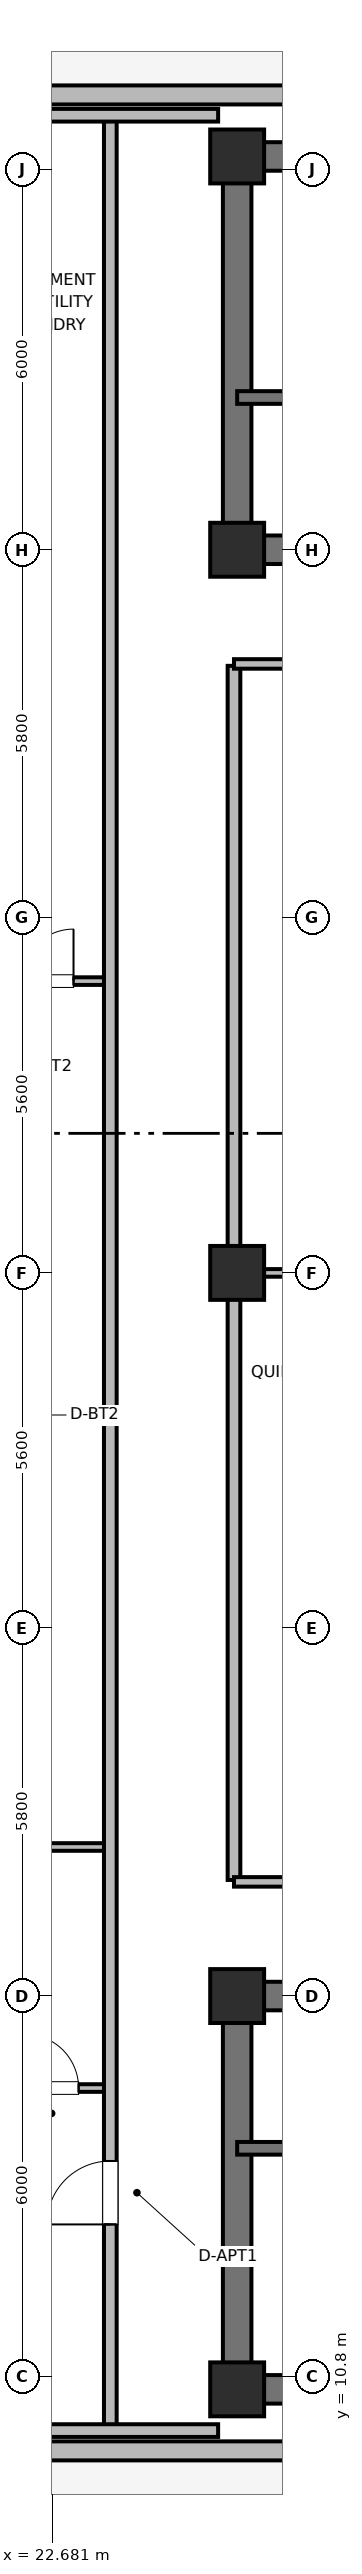
"""IFC4 building model, lengths in metres.
Left out: names, types, materials, properties, quantities, classifications, styles, units other than length and angle.
Written with IfcOpenShell. Run it as: python <this file> out.ifc"""

import sys

from ifc_helpers import new_model, si_unit, direction, frame, frame_2d, origin, origin_2d, place, context, subcontext, project, spatial, rectangle, extrude, element, fill, save


model = new_model("IFC4")
c1 = context("Model", 3, precision=1e-05, world=origin(), true_north=direction((0.0, 1.0)))
c2 = subcontext(c1, "Body", "Model", "MODEL_VIEW")
j1 = project(units=[si_unit("LENGTHUNIT", "METRE"), si_unit("PLANEANGLEUNIT", "RADIAN")], contexts=[c1])
p1 = place(None, origin())
s1 = spatial("IfcSite", under=j1, at=p1, CompositionType="ELEMENT")
p2 = place(p1, origin())
s2 = spatial("IfcBuilding", under=s1, at=p2, CompositionType="ELEMENT")
p3 = place(p2, frame((0.0, 0.0, 225.8)))
s3 = spatial("IfcBuildingStorey", under=s2, at=p3, CompositionType="ELEMENT", Elevation=225.8)
p4 = place(p3, frame((52.8, 10.6, 0.0), z_axis=(0.0, 0.0, 1.0), x_axis=(-1.0, 0.0, 0.0)))
e1 = element("IfcWall", 1, at=p4, inside=s3, PredefinedType="SHEAR", context=c2, shape_type="SweptSolid", body=[
    extrude(rectangle(XDim=27.2, YDim=0.45, at=frame_2d((13.6, 0.0))), origin(), (0.0, 0.0, 1.0), 3.7),
])
p5 = place(p3, frame((25.6, 10.825, 0.0), z_axis=(0.0, 0.0, 1.0), x_axis=(0.0, 1.0, 0.0)))
e2 = element("IfcWall", 2, at=p5, inside=s3, PredefinedType="SHEAR", context=c2, shape_type="SweptSolid", body=[
    extrude(rectangle(XDim=5.75, YDim=0.45, at=frame_2d((2.875, 0.0))), origin(), (0.0, 0.0, 1.0), 3.7),
])
p6 = place(p3, frame((25.6, 16.8, 0.0), z_axis=(0.0, 0.0, 1.0), x_axis=(1.0, 0.0, 0.0)))
e3 = element("IfcWall", 3, at=p6, inside=s3, PredefinedType="SHEAR", context=c2, shape_type="SweptSolid", body=[
    extrude(rectangle(XDim=27.2, YDim=0.45, at=frame_2d((13.6, 0.0))), origin(), (0.0, 0.0, 1.0), 3.7),
])
p7 = place(p6, frame((1.8, 0.0, 0.0)))
e4 = element("IfcOpeningElement", 4, at=p7, cuts=e3, PredefinedType="OPENING", context=c2, shape_type="SweptSolid", body=[
    extrude(rectangle(XDim=1.1, YDim=2.15, at=frame_2d((0.55, 1.075))), frame((0.0, 0.235, 0.0), z_axis=(0.0, -1.0, 0.0), x_axis=(1.0, 0.0, 0.0)), (0.0, 0.0, 1.0), 0.47),
])
p8 = place(p6, frame((5.6, 0.0, 0.0)))
e5 = element("IfcOpeningElement", 5, at=p8, cuts=e3, PredefinedType="OPENING", context=c2, shape_type="SweptSolid", body=[
    extrude(rectangle(XDim=0.85, YDim=2.1, at=frame_2d((0.425, 1.05))), frame((0.0, 0.235, 0.0), z_axis=(0.0, -1.0, 0.0), x_axis=(1.0, 0.0, 0.0)), (0.0, 0.0, 1.0), 0.47),
])
p9 = place(p6, frame((13.0, 0.0, 0.0)))
e6 = element("IfcOpeningElement", 6, at=p9, cuts=e3, PredefinedType="OPENING", context=c2, shape_type="SweptSolid", body=[
    extrude(rectangle(XDim=1.2, YDim=2.15, at=frame_2d((0.6, 1.075))), frame((0.0, 0.235, 0.0), z_axis=(0.0, -1.0, 0.0), x_axis=(1.0, 0.0, 0.0)), (0.0, 0.0, 1.0), 0.47),
])
p10 = place(p6, frame((19.2, 0.0, 0.0)))
e7 = element("IfcOpeningElement", 7, at=p10, cuts=e3, PredefinedType="OPENING", context=c2, shape_type="SweptSolid", body=[
    extrude(rectangle(XDim=0.85, YDim=2.1, at=frame_2d((0.425, 1.05))), frame((0.0, 0.235, 0.0), z_axis=(0.0, -1.0, 0.0), x_axis=(1.0, 0.0, 0.0)), (0.0, 0.0, 1.0), 0.47),
])
p11 = place(p6, frame((23.8, 0.0, 0.0)))
e8 = element("IfcOpeningElement", 8, at=p11, cuts=e3, PredefinedType="OPENING", context=c2, shape_type="SweptSolid", body=[
    extrude(rectangle(XDim=0.9, YDim=2.1, at=frame_2d((0.45, 1.05))), frame((0.0, 0.235, 0.0), z_axis=(0.0, -1.0, 0.0), x_axis=(1.0, 0.0, 0.0)), (0.0, 0.0, 1.0), 0.47),
])
p12 = place(p3, frame((25.6, 45.8, 0.0), z_axis=(0.0, 0.0, 1.0), x_axis=(1.0, 0.0, 0.0)))
e9 = element("IfcWall", 9, at=p12, inside=s3, PredefinedType="SHEAR", context=c2, shape_type="SweptSolid", body=[
    extrude(rectangle(XDim=27.2, YDim=0.45, at=frame_2d((13.6, 0.0))), origin(), (0.0, 0.0, 1.0), 3.7),
])
p13 = place(p3, frame((25.6, 39.825, 0.0), z_axis=(0.0, 0.0, 1.0), x_axis=(0.0, 1.0, 0.0)))
e10 = element("IfcWall", 10, at=p13, inside=s3, PredefinedType="SHEAR", context=c2, shape_type="SweptSolid", body=[
    extrude(rectangle(XDim=5.75, YDim=0.45, at=frame_2d((2.875, 0.0))), origin(), (0.0, 0.0, 1.0), 3.7),
])
p14 = place(p3, frame((52.8, 39.6, 0.0), z_axis=(0.0, 0.0, 1.0), x_axis=(-1.0, 0.0, 0.0)))
e11 = element("IfcWall", 11, at=p14, inside=s3, PredefinedType="SHEAR", context=c2, shape_type="SweptSolid", body=[
    extrude(rectangle(XDim=27.2, YDim=0.45, at=frame_2d((13.6, 0.0))), origin(), (0.0, 0.0, 1.0), 3.7),
])
p15 = place(p14, frame((24.2, 0.0, 0.0)))
e12 = element("IfcOpeningElement", 12, at=p15, cuts=e11, PredefinedType="OPENING", context=c2, shape_type="SweptSolid", body=[
    extrude(rectangle(XDim=1.1, YDim=2.15, at=frame_2d((0.55, 1.075))), frame((0.0, 0.235, 0.0), z_axis=(0.0, -1.0, 0.0), x_axis=(1.0, 0.0, 0.0)), (0.0, 0.0, 1.0), 0.47),
])
p16 = place(p14, frame((20.55, 0.0, 0.0)))
e13 = element("IfcOpeningElement", 13, at=p16, cuts=e11, PredefinedType="OPENING", context=c2, shape_type="SweptSolid", body=[
    extrude(rectangle(XDim=0.95, YDim=2.1, at=frame_2d((0.475, 1.05))), frame((0.0, 0.235, 0.0), z_axis=(0.0, -1.0, 0.0), x_axis=(1.0, 0.0, 0.0)), (0.0, 0.0, 1.0), 0.47),
])
p17 = place(p14, frame((15.1, 0.0, 0.0)))
e14 = element("IfcOpeningElement", 14, at=p17, cuts=e11, PredefinedType="OPENING", context=c2, shape_type="SweptSolid", body=[
    extrude(rectangle(XDim=1.2, YDim=2.15, at=frame_2d((0.6, 1.075))), frame((0.0, 0.235, 0.0), z_axis=(0.0, -1.0, 0.0), x_axis=(1.0, 0.0, 0.0)), (0.0, 0.0, 1.0), 0.47),
])
p18 = place(p14, frame((13.05, 0.0, 0.0)))
e15 = element("IfcOpeningElement", 15, at=p18, cuts=e11, PredefinedType="OPENING", context=c2, shape_type="SweptSolid", body=[
    extrude(rectangle(XDim=0.85, YDim=2.1, at=frame_2d((0.425, 1.05))), frame((0.0, 0.235, 0.0), z_axis=(0.0, -1.0, 0.0), x_axis=(1.0, 0.0, 0.0)), (0.0, 0.0, 1.0), 0.47),
])
p19 = place(p14, frame((11.0, 0.0, 0.0)))
e16 = element("IfcOpeningElement", 16, at=p19, cuts=e11, PredefinedType="OPENING", context=c2, shape_type="SweptSolid", body=[
    extrude(rectangle(XDim=0.85, YDim=2.1, at=frame_2d((0.425, 1.05))), frame((0.0, 0.235, 0.0), z_axis=(0.0, -1.0, 0.0), x_axis=(1.0, 0.0, 0.0)), (0.0, 0.0, 1.0), 0.47),
])
p20 = place(p14, frame((7.35, 0.0, 0.0)))
e17 = element("IfcOpeningElement", 17, at=p20, cuts=e11, PredefinedType="OPENING", context=c2, shape_type="SweptSolid", body=[
    extrude(rectangle(XDim=0.85, YDim=2.1, at=frame_2d((0.425, 1.05))), frame((0.0, 0.235, 0.0), z_axis=(0.0, -1.0, 0.0), x_axis=(1.0, 0.0, 0.0)), (0.0, 0.0, 1.0), 0.47),
])
p21 = place(p14, frame((4.2, 0.0, 0.0)))
e18 = element("IfcOpeningElement", 18, at=p21, cuts=e11, PredefinedType="OPENING", context=c2, shape_type="SweptSolid", body=[
    extrude(rectangle(XDim=1.3, YDim=2.2, at=frame_2d((0.65, 1.1))), frame((0.0, 0.235, 0.0), z_axis=(0.0, -1.0, 0.0), x_axis=(1.0, 0.0, 0.0)), (0.0, 0.0, 1.0), 0.47),
])
for number, where, z_axis, x_axis in (
    (19, (25.6, 10.6, 0.0), (0.0, 0.0, 1.0), (1.0, 0.0, 0.0)),
    (20, (25.6, 16.8, 0.0), (0.0, 0.0, 1.0), (1.0, 0.0, 0.0)),
    (21, (25.6, 39.6, 0.0), (0.0, 0.0, 1.0), (1.0, 0.0, 0.0)),
    (22, (25.6, 45.8, 0.0), (0.0, 0.0, 1.0), (1.0, 0.0, 0.0)),
    (23, (25.6, 28.2, 0.0), (0.0, 0.0, 1.0), (1.0, 0.0, 0.0)),
):
    element("IfcColumn", number, at=place(p3, frame(where, z_axis=z_axis, x_axis=x_axis)), inside=s3, PredefinedType="COLUMN", context=c2, shape_type="SweptSolid", body=[
        extrude(rectangle(XDim=0.85, YDim=0.85, at=origin_2d()), origin(), (0.0, 0.0, 1.0), 3.7),
    ])
p22 = place(p3, frame((22.56, 9.63, 0.0), z_axis=(0.0, 0.0, 1.0), x_axis=(1.0, 0.0, 0.0)))
e24 = element("IfcWall", 24, at=p22, inside=s3, PredefinedType="SOLIDWALL", context=c2, shape_type="SweptSolid", body=[
    extrude(rectangle(XDim=33.28, YDim=0.3, at=frame_2d((16.64, 0.0))), origin(), (0.0, 0.0, 1.0), 2.73),
])
p23 = place(p22, frame((4.647, 0.0, 0.71)))
e25 = element("IfcOpeningElement", 25, at=p23, cuts=e24, PredefinedType="OPENING", context=c2, shape_type="SweptSolid", body=[
    extrude(rectangle(XDim=1.6, YDim=1.9, at=frame_2d((0.8, 0.95))), frame((0.0, 0.16, 0.0), z_axis=(0.0, -1.0, 0.0), x_axis=(1.0, 0.0, 0.0)), (0.0, 0.0, 1.0), 0.32),
])
p24 = place(p22, frame((7.845, 0.0, 0.71)))
e26 = element("IfcOpeningElement", 26, at=p24, cuts=e24, PredefinedType="OPENING", context=c2, shape_type="SweptSolid", body=[
    extrude(rectangle(XDim=1.6, YDim=1.9, at=frame_2d((0.8, 0.95))), frame((0.0, 0.16, 0.0), z_axis=(0.0, -1.0, 0.0), x_axis=(1.0, 0.0, 0.0)), (0.0, 0.0, 1.0), 0.32),
])
p25 = place(p22, frame((14.241, 0.0, 0.71)))
e27 = element("IfcOpeningElement", 27, at=p25, cuts=e24, PredefinedType="OPENING", context=c2, shape_type="SweptSolid", body=[
    extrude(rectangle(XDim=1.6, YDim=1.9, at=frame_2d((0.8, 0.95))), frame((0.0, 0.16, 0.0), z_axis=(0.0, -1.0, 0.0), x_axis=(1.0, 0.0, 0.0)), (0.0, 0.0, 1.0), 0.32),
])
p26 = place(p22, frame((17.439, 0.0, 0.71)))
e28 = element("IfcOpeningElement", 28, at=p26, cuts=e24, PredefinedType="OPENING", context=c2, shape_type="SweptSolid", body=[
    extrude(rectangle(XDim=1.6, YDim=1.9, at=frame_2d((0.8, 0.95))), frame((0.0, 0.16, 0.0), z_axis=(0.0, -1.0, 0.0), x_axis=(1.0, 0.0, 0.0)), (0.0, 0.0, 1.0), 0.32),
])
p27 = place(p22, frame((23.835, 0.0, 0.71)))
e29 = element("IfcOpeningElement", 29, at=p27, cuts=e24, PredefinedType="OPENING", context=c2, shape_type="SweptSolid", body=[
    extrude(rectangle(XDim=1.6, YDim=1.9, at=frame_2d((0.8, 0.95))), frame((0.0, 0.16, 0.0), z_axis=(0.0, -1.0, 0.0), x_axis=(1.0, 0.0, 0.0)), (0.0, 0.0, 1.0), 0.32),
])
p28 = place(p22, frame((27.033, 0.0, 0.71)))
e30 = element("IfcOpeningElement", 30, at=p28, cuts=e24, PredefinedType="OPENING", context=c2, shape_type="SweptSolid", body=[
    extrude(rectangle(XDim=1.6, YDim=1.9, at=frame_2d((0.8, 0.95))), frame((0.0, 0.16, 0.0), z_axis=(0.0, -1.0, 0.0), x_axis=(1.0, 0.0, 0.0)), (0.0, 0.0, 1.0), 0.32),
])
p29 = place(p3, frame((55.84, 46.77, 0.0), z_axis=(0.0, 0.0, 1.0), x_axis=(-1.0, 0.0, 0.0)))
e31 = element("IfcWall", 31, at=p29, inside=s3, PredefinedType="SOLIDWALL", context=c2, shape_type="SweptSolid", body=[
    extrude(rectangle(XDim=33.28, YDim=0.3, at=frame_2d((16.64, 0.0))), origin(), (0.0, 0.0, 1.0), 2.73),
])
p30 = place(p29, frame((4.93, 0.0, 0.71)))
e32 = element("IfcOpeningElement", 32, at=p30, cuts=e31, PredefinedType="OPENING", context=c2, shape_type="SweptSolid", body=[
    extrude(rectangle(XDim=2.1, YDim=1.9, at=frame_2d((1.05, 0.95))), frame((0.0, 0.16, 0.0), z_axis=(0.0, -1.0, 0.0), x_axis=(1.0, 0.0, 0.0)), (0.0, 0.0, 1.0), 0.32),
])
p31 = place(p29, frame((8.483, 0.0, 0.71)))
e33 = element("IfcOpeningElement", 33, at=p31, cuts=e31, PredefinedType="OPENING", context=c2, shape_type="SweptSolid", body=[
    extrude(rectangle(XDim=2.1, YDim=1.9, at=frame_2d((1.05, 0.95))), frame((0.0, 0.16, 0.0), z_axis=(0.0, -1.0, 0.0), x_axis=(1.0, 0.0, 0.0)), (0.0, 0.0, 1.0), 0.32),
])
p32 = place(p29, frame((15.59, 0.0, 0.71)))
e34 = element("IfcOpeningElement", 34, at=p32, cuts=e31, PredefinedType="OPENING", context=c2, shape_type="SweptSolid", body=[
    extrude(rectangle(XDim=2.1, YDim=1.9, at=frame_2d((1.05, 0.95))), frame((0.0, 0.16, 0.0), z_axis=(0.0, -1.0, 0.0), x_axis=(1.0, 0.0, 0.0)), (0.0, 0.0, 1.0), 0.32),
])
p33 = place(p29, frame((22.697, 0.0, 0.71)))
e35 = element("IfcOpeningElement", 35, at=p33, cuts=e31, PredefinedType="OPENING", context=c2, shape_type="SweptSolid", body=[
    extrude(rectangle(XDim=2.1, YDim=1.9, at=frame_2d((1.05, 0.95))), frame((0.0, 0.16, 0.0), z_axis=(0.0, -1.0, 0.0), x_axis=(1.0, 0.0, 0.0)), (0.0, 0.0, 1.0), 0.32),
])
p34 = place(p29, frame((26.25, 0.0, 0.71)))
e36 = element("IfcOpeningElement", 36, at=p34, cuts=e31, PredefinedType="OPENING", context=c2, shape_type="SweptSolid", body=[
    extrude(rectangle(XDim=2.1, YDim=1.9, at=frame_2d((1.05, 0.95))), frame((0.0, 0.16, 0.0), z_axis=(0.0, -1.0, 0.0), x_axis=(1.0, 0.0, 0.0)), (0.0, 0.0, 1.0), 0.32),
])
p35 = place(p3, frame((25.6, 14.4, 0.0), z_axis=(0.0, 0.0, 1.0), x_axis=(1.0, 0.0, 0.0)))
e37 = element("IfcWall", 37, at=p35, inside=s3, PredefinedType="SHEAR", context=c2, shape_type="SweptSolid", body=[
    extrude(rectangle(XDim=9.55, YDim=0.2, at=frame_2d((4.775, 0.0))), origin(), (0.0, 0.0, 1.0), 3.7),
])
p36 = place(p35, frame((1.05, 0.0, 0.0)))
e38 = element("IfcOpeningElement", 38, at=p36, cuts=e37, PredefinedType="OPENING", context=c2, shape_type="SweptSolid", body=[
    extrude(rectangle(XDim=1.1, YDim=2.15, at=frame_2d((0.55, 1.075))), frame((0.0, 0.11, 0.0), z_axis=(0.0, -1.0, 0.0), x_axis=(1.0, 0.0, 0.0)), (0.0, 0.0, 1.0), 0.22),
])
p37 = place(p3, frame((35.15, 42.0, 0.0), z_axis=(0.0, 0.0, 1.0), x_axis=(-1.0, 0.0, 0.0)))
e39 = element("IfcWall", 39, at=p37, inside=s3, PredefinedType="SHEAR", context=c2, shape_type="SweptSolid", body=[
    extrude(rectangle(XDim=9.55, YDim=0.2, at=frame_2d((4.775, 0.0))), origin(), (0.0, 0.0, 1.0), 3.7),
])
p38 = place(p37, frame((7.25, 0.0, 0.0)))
e40 = element("IfcOpeningElement", 40, at=p38, cuts=e39, PredefinedType="OPENING", context=c2, shape_type="SweptSolid", body=[
    extrude(rectangle(XDim=1.1, YDim=2.15, at=frame_2d((0.55, 1.075))), frame((0.0, 0.11, 0.0), z_axis=(0.0, -1.0, 0.0), x_axis=(1.0, 0.0, 0.0)), (0.0, 0.0, 1.0), 0.22),
])
p39 = place(p3, frame((25.55, 18.63, 0.0), z_axis=(0.0, 0.0, 1.0), x_axis=(0.0, 1.0, 0.0)))
e41 = element("IfcWall", 41, at=p39, inside=s3, PredefinedType="PARTITIONING", context=c2, shape_type="SweptSolid", body=[
    extrude(rectangle(XDim=19.14, YDim=0.2, at=frame_2d((9.57, 0.0))), origin(), (0.0, 0.0, 1.0), 2.56),
])
for number, where, z_axis, x_axis in (
    (42, (25.55, 18.6, 0.0), (0.0, 0.0, 1.0), (1.0, 0.0, 0.0)),
    (43, (25.55, 37.8, 0.0), (0.0, 0.0, 1.0), (1.0, 0.0, 0.0)),
):
    element("IfcWall", number, at=place(p3, frame(where, z_axis=z_axis, x_axis=x_axis)), inside=s3, PredefinedType="PARTITIONING", context=c2, shape_type="SweptSolid", body=[
        extrude(rectangle(XDim=2.7, YDim=0.15, at=frame_2d((1.35, 0.0))), origin(), (0.0, 0.0, 1.0), 2.56),
    ])
p40 = place(p3, frame((25.6, 28.2, 0.0), z_axis=(0.0, 0.0, 1.0), x_axis=(1.0, 0.0, 0.0)))
e44 = element("IfcWall", 44, at=p40, inside=s3, PredefinedType="PARTITIONING", context=c2, shape_type="SweptSolid", body=[
    extrude(rectangle(XDim=2.66, YDim=0.12, at=frame_2d((1.33, 0.0))), origin(), (0.0, 0.0, 1.0), 2.56),
])
p41 = place(p3, frame((21.65, 15.35, 0.0), z_axis=(0.0, 0.0, 1.0), x_axis=(1.0, 0.0, 0.0)))
e45 = element("IfcWall", 45, at=p41, inside=s3, PredefinedType="PARTITIONING", context=c2, shape_type="SweptSolid", body=[
    extrude(rectangle(XDim=1.95, YDim=0.12, at=frame_2d((0.975, 0.0))), origin(), (0.0, 0.0, 1.0), 2.56),
])
p42 = place(p41, frame((0.6, 0.0, 0.0)))
e46 = element("IfcOpeningElement", 46, at=p42, cuts=e45, PredefinedType="OPENING", context=c2, shape_type="SweptSolid", body=[
    extrude(rectangle(XDim=0.85, YDim=2.1, at=frame_2d((0.425, 1.05))), frame((0.0, 0.07, 0.0), z_axis=(0.0, -1.0, 0.0), x_axis=(1.0, 0.0, 0.0)), (0.0, 0.0, 1.0), 0.14),
])
p43 = place(p3, frame((21.65, 19.15, 0.0), z_axis=(0.0, 0.0, 1.0), x_axis=(1.0, 0.0, 0.0)))
e47 = element("IfcWall", 47, at=p43, inside=s3, PredefinedType="PARTITIONING", context=c2, shape_type="SweptSolid", body=[
    extrude(rectangle(XDim=1.95, YDim=0.12, at=frame_2d((0.975, 0.0))), origin(), (0.0, 0.0, 1.0), 2.56),
])
p44 = place(p3, frame((21.65, 32.8, 0.0), z_axis=(0.0, 0.0, 1.0), x_axis=(1.0, 0.0, 0.0)))
e48 = element("IfcWall", 48, at=p44, inside=s3, PredefinedType="PARTITIONING", context=c2, shape_type="SweptSolid", body=[
    extrude(rectangle(XDim=1.95, YDim=0.12, at=frame_2d((0.975, 0.0))), origin(), (0.0, 0.0, 1.0), 2.56),
])
p45 = place(p44, frame((0.55, 0.0, 0.0)))
e49 = element("IfcOpeningElement", 49, at=p45, cuts=e48, PredefinedType="OPENING", context=c2, shape_type="SweptSolid", body=[
    extrude(rectangle(XDim=0.82, YDim=2.08, at=frame_2d((0.41, 1.04))), frame((0.0, 0.07, 0.0), z_axis=(0.0, -1.0, 0.0), x_axis=(1.0, 0.0, 0.0)), (0.0, 0.0, 1.0), 0.14),
])
p46 = place(p3, frame((23.6, 9.95, 0.0), z_axis=(0.0, 0.0, 1.0), x_axis=(0.0, 1.0, 0.0)))
e50 = element("IfcWall", 50, at=p46, inside=s3, PredefinedType="PARTITIONING", context=c2, shape_type="SweptSolid", body=[
    extrude(rectangle(XDim=36.5, YDim=0.2, at=frame_2d((18.25, 0.0))), origin(), (0.0, 0.0, 1.0), 2.56),
])
p47 = place(p46, frame((3.25, 0.0, 0.0)))
e51 = element("IfcOpeningElement", 51, at=p47, cuts=e50, PredefinedType="OPENING", context=c2, shape_type="SweptSolid", body=[
    extrude(rectangle(XDim=1.0, YDim=2.15, at=frame_2d((0.5, 1.075))), frame((0.0, 0.11, 0.0), z_axis=(0.0, -1.0, 0.0), x_axis=(1.0, 0.0, 0.0)), (0.0, 0.0, 1.0), 0.22),
])
for number, where, z_axis, x_axis in (
    (52, (21.546, 9.95, 0.0), (0.0, 0.0, 1.0), (1.0, 0.0, 0.0)),
    (53, (21.546, 46.45, 0.0), (0.0, 0.0, 1.0), (1.0, 0.0, 0.0)),
):
    element("IfcWall", number, at=place(p3, frame(where, z_axis=z_axis, x_axis=x_axis)), inside=s3, PredefinedType="PARTITIONING", context=c2, shape_type="SweptSolid", body=[
        extrude(rectangle(XDim=3.754, YDim=0.2, at=frame_2d((1.877, 0.0))), origin(), (0.0, 0.0, 1.0), 2.56),
    ])
p48 = place(p42, origin())
e54 = element("IfcDoor", 54, at=p48, inside=s3, OperationType="SINGLE_SWING_LEFT", PredefinedType="DOOR", context=c2, shape_type="SweptSolid", body=[
    extrude(rectangle(XDim=0.85, YDim=2.1, at=frame_2d((0.425, 1.05))), frame((0.0, 0.025, 0.0), z_axis=(0.0, -1.0, 0.0), x_axis=(1.0, 0.0, 0.0)), (0.0, 0.0, 1.0), 0.05),
])
fill(e46, e54)
p49 = place(p45, origin())
e55 = element("IfcDoor", 55, at=p49, inside=s3, OperationType="SINGLE_SWING_RIGHT", PredefinedType="DOOR", context=c2, shape_type="SweptSolid", body=[
    extrude(rectangle(XDim=0.82, YDim=2.08, at=frame_2d((0.41, 1.04))), frame((0.0, 0.025, 0.0), z_axis=(0.0, -1.0, 0.0), x_axis=(1.0, 0.0, 0.0)), (0.0, 0.0, 1.0), 0.05),
])
fill(e49, e55)
p50 = place(p47, origin())
e56 = element("IfcDoor", 56, at=p50, inside=s3, OperationType="SINGLE_SWING_LEFT", PredefinedType="DOOR", context=c2, shape_type="SweptSolid", body=[
    extrude(rectangle(XDim=1.0, YDim=2.15, at=frame_2d((0.5, 1.075))), frame((0.0, 0.025, 0.0), z_axis=(0.0, -1.0, 0.0), x_axis=(1.0, 0.0, 0.0)), (0.0, 0.0, 1.0), 0.05),
])
fill(e51, e56)
save(model, sys.argv[1])
